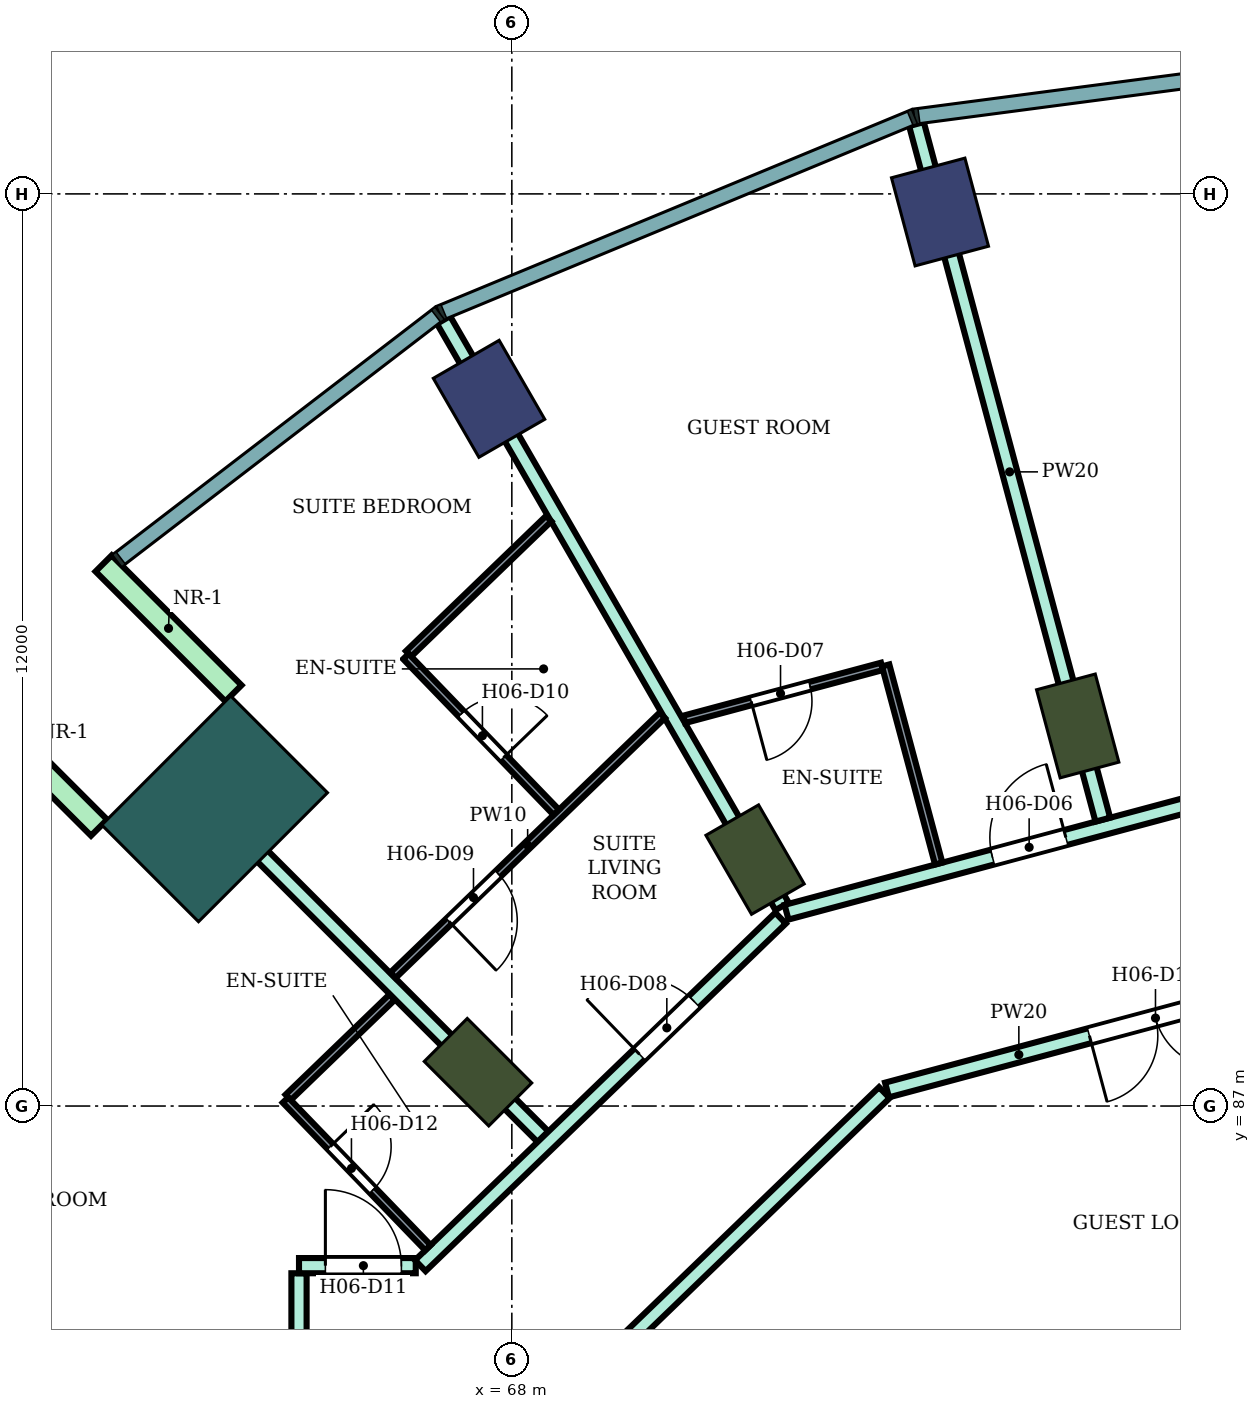
"""IFC4 building model, lengths in metres.
Left out: names, types, materials, properties, quantities, classifications, styles, units other than length and angle.
Written with IfcOpenShell. Run it as: python <this file> out.ifc"""

import sys

from ifc_helpers import new_model, si_unit, direction, frame, frame_2d, origin, origin_2d, place, context, subcontext, project, spatial, rectangle, extrude, element, fill, save


model = new_model("IFC4")
c1 = context("Model", 3, precision=1e-05, world=origin(), true_north=direction((0.0, 1.0)))
c2 = subcontext(c1, "Body", "Model", "MODEL_VIEW")
j1 = project(units=[si_unit("LENGTHUNIT", "METRE"), si_unit("PLANEANGLEUNIT", "RADIAN")], contexts=[c1])
p1 = place(None, origin())
s1 = spatial("IfcSite", under=j1, at=p1, CompositionType="ELEMENT")
p2 = place(p1, origin())
s2 = spatial("IfcBuilding", under=s1, at=p2, CompositionType="ELEMENT")
p3 = place(p2, frame((0.0, 0.0, 97.6)))
s3 = spatial("IfcBuildingStorey", under=s2, at=p3, CompositionType="ELEMENT", Elevation=97.6)
for number, where, z_axis, x_axis in (
    (1, (73.633, 98.762, 0.0), (0.0, 0.0, 1.0), (-0.259, 0.966, 0.0)),
    (2, (67.7, 96.304, 0.0), (0.0, 0.0, 1.0), (-0.5, 0.866, 0.0)),
):
    element("IfcColumn", number, at=place(p3, frame(where, z_axis=z_axis, x_axis=x_axis)), inside=s3, PredefinedType="COLUMN", context=c2, shape_type="SweptSolid", body=[
        extrude(rectangle(XDim=1.2, YDim=1.0, at=origin_2d()), origin(), (0.0, 0.0, 1.0), 3.8),
    ])
for number, where, z_axis, x_axis in (
    (3, (75.445, 92.0, 0.0), (0.0, 0.0, 1.0), (-0.259, 0.966, 0.0)),
    (4, (71.2, 90.242, 0.0), (0.0, 0.0, 1.0), (-0.5, 0.866, 0.0)),
    (5, (67.555, 87.445, 0.0), (0.0, 0.0, 1.0), (-0.707, 0.707, 0.0)),
):
    element("IfcColumn", number, at=place(p3, frame(where, z_axis=z_axis, x_axis=x_axis)), inside=s3, PredefinedType="COLUMN", context=c2, shape_type="SweptSolid", body=[
        extrude(rectangle(XDim=1.2, YDim=0.8, at=origin_2d()), origin(), (0.0, 0.0, 1.0), 3.8),
    ])
p4 = place(p3, frame((64.09, 90.91, 0.0), z_axis=(0.0, 0.0, 1.0), x_axis=(-0.707106781187, 0.707106781187, 0.0)))
e6 = element("IfcColumn", 6, at=p4, inside=s3, PredefinedType="COLUMN", context=c2, shape_type="SweptSolid", body=[
    extrude(rectangle(XDim=1.8, YDim=2.4, at=origin_2d()), origin(), (0.0, 0.0, 1.0), 3.8),
])
for number, where, z_axis, x_axis in (
    (7, (64.338, 92.43, 0.0), (0.0, 0.0, 1.0), (-0.707, 0.707, 0.0)),
    (8, (62.57, 90.662, 0.0), (0.0, 0.0, 1.0), (-0.707, 0.707, 0.0)),
):
    element("IfcWall", number, at=place(p3, frame(where, z_axis=z_axis, x_axis=x_axis)), inside=s3, PredefinedType="NOTDEFINED", context=c2, shape_type="SweptSolid", body=[
        extrude(rectangle(XDim=2.416, YDim=0.3, at=frame_2d((1.208, 0.0))), origin(), (0.0, 0.0, 1.0), 3.8),
    ])
p5 = place(p3, frame((63.6, 91.409, 0.0), z_axis=(0.0, 0.0, 1.0), x_axis=(0.706945318761, -0.707268206752, 0.0)))
e9 = element("IfcWall", 9, at=p5, inside=s3, PredefinedType="PARTITIONING", context=c2, shape_type="SweptSolid", body=[
    extrude(rectangle(XDim=6.805, YDim=0.2, at=frame_2d((3.402, 0.0))), origin(), (0.0, 0.0, 1.0), 3.35),
])
p6 = place(p3, frame((65.2, 83.401, 0.0), z_axis=(0.0, 0.0, 1.0), x_axis=(0.0, 1.0, 0.0)))
e10 = element("IfcWall", 10, at=p6, inside=s3, PredefinedType="PARTITIONING", context=c2, shape_type="SweptSolid", body=[
    extrude(rectangle(XDim=1.399, YDim=0.2, at=frame_2d((0.7, 0.0))), origin(), (0.0, 0.0, 1.0), 3.35),
])
p7 = place(p3, frame((65.2, 84.9, 0.0), z_axis=(0.0, 0.0, 1.0), x_axis=(1.0, 0.0, 0.0)))
e11 = element("IfcWall", 11, at=p7, inside=s3, PredefinedType="PARTITIONING", context=c2, shape_type="SweptSolid", body=[
    extrude(rectangle(XDim=1.536, YDim=0.2, at=frame_2d((0.768, 0.0))), origin(), (0.0, 0.0, 1.0), 3.35),
])
p8 = place(p7, frame((0.347, 0.0, 0.0)))
e12 = element("IfcOpeningElement", 12, at=p8, cuts=e11, PredefinedType="OPENING", context=c2, shape_type="SweptSolid", body=[
    extrude(rectangle(XDim=1.0, YDim=2.1, at=frame_2d((0.5, 1.05))), frame((0.0, 0.11, 0.0), z_axis=(0.0, -1.0, 0.0), x_axis=(1.0, 0.0, 0.0)), (0.0, 0.0, 1.0), 0.22),
])
p9 = place(p3, frame((66.796, 84.9, 0.0), z_axis=(0.0, 0.0, 1.0), x_axis=(0.719690784855, 0.694294731505, 0.0)))
e13 = element("IfcWall", 13, at=p9, inside=s3, PredefinedType="PARTITIONING", context=c2, shape_type="SweptSolid", body=[
    extrude(rectangle(XDim=6.585, YDim=0.2, at=frame_2d((3.292, 0.0))), origin(), (0.0, 0.0, 1.0), 3.35),
])
p10 = place(p9, frame((4.006, 0.0, 0.0)))
e14 = element("IfcOpeningElement", 14, at=p10, cuts=e13, PredefinedType="OPENING", context=c2, shape_type="SweptSolid", body=[
    extrude(rectangle(XDim=1.0, YDim=2.1, at=frame_2d((0.5, 1.05))), frame((0.0, 0.11, 0.0), z_axis=(0.0, -1.0, 0.0), x_axis=(1.0, 0.0, 0.0)), (0.0, 0.0, 1.0), 0.22),
])
p11 = place(p3, frame((67.102, 97.342, 0.0), z_axis=(0.0, 0.0, 1.0), x_axis=(0.499900389553, -0.866082906265, 0.0)))
e15 = element("IfcWall", 15, at=p11, inside=s3, PredefinedType="PARTITIONING", context=c2, shape_type="SweptSolid", body=[
    extrude(rectangle(XDim=8.908, YDim=0.2, at=frame_2d((4.454, 0.0))), origin(), (0.0, 0.0, 1.0), 3.35),
])
p12 = place(p3, frame((68.987, 83.4, 0.0), z_axis=(0.0, 0.0, 1.0), x_axis=(0.719586298962, 0.694403022997, 0.0)))
e16 = element("IfcWall", 16, at=p12, inside=s3, PredefinedType="PARTITIONING", context=c2, shape_type="SweptSolid", body=[
    extrude(rectangle(XDim=5.439, YDim=0.2, at=frame_2d((2.719, 0.0))), origin(), (0.0, 0.0, 1.0), 3.35),
])
p13 = place(p3, frame((71.614, 89.55, 0.0), z_axis=(0.0, 0.0, 1.0), x_axis=(0.965982378603, 0.258607896685, 0.0)))
e17 = element("IfcWall", 17, at=p13, inside=s3, PredefinedType="PARTITIONING", context=c2, shape_type="SweptSolid", body=[
    extrude(rectangle(XDim=8.632, YDim=0.2, at=frame_2d((4.316, 0.0))), origin(), (0.0, 0.0, 1.0), 3.35),
])
p14 = place(p13, frame((2.804, 0.0, 0.0)))
e18 = element("IfcOpeningElement", 18, at=p14, cuts=e17, PredefinedType="OPENING", context=c2, shape_type="SweptSolid", body=[
    extrude(rectangle(XDim=1.0, YDim=2.1, at=frame_2d((0.5, 1.05))), frame((0.0, 0.11, 0.0), z_axis=(0.0, -1.0, 0.0), x_axis=(1.0, 0.0, 0.0)), (0.0, 0.0, 1.0), 0.22),
])
p15 = place(p3, frame((72.936, 87.211, 0.0), z_axis=(0.0, 0.0, 1.0), x_axis=(0.965917703859, 0.258849356521, 0.0)))
e19 = element("IfcWall", 19, at=p15, inside=s3, PredefinedType="PARTITIONING", context=c2, shape_type="SweptSolid", body=[
    extrude(rectangle(XDim=7.182, YDim=0.2, at=frame_2d((3.591, 0.0))), origin(), (0.0, 0.0, 1.0), 3.35),
])
p16 = place(p15, frame((2.757, 0.0, 0.0)))
e20 = element("IfcOpeningElement", 20, at=p16, cuts=e19, PredefinedType="OPENING", context=c2, shape_type="SweptSolid", body=[
    extrude(rectangle(XDim=1.8, YDim=2.1, at=frame_2d((0.9, 1.05))), frame((0.0, 0.11, 0.0), z_axis=(0.0, -1.0, 0.0), x_axis=(1.0, 0.0, 0.0)), (0.0, 0.0, 1.0), 0.22),
])
p17 = place(p3, frame((73.323, 99.918, 0.0), z_axis=(0.0, 0.0, 1.0), x_axis=(0.258812513968, -0.965927576278, 0.0)))
e21 = element("IfcWall", 21, at=p17, inside=s3, PredefinedType="PARTITIONING", context=c2, shape_type="SweptSolid", body=[
    extrude(rectangle(XDim=9.474, YDim=0.2, at=frame_2d((4.737, 0.0))), origin(), (0.0, 0.0, 1.0), 3.35),
])
p18 = place(p3, frame((65.058, 87.114, 0.0), z_axis=(0.0, 0.0, 1.0), x_axis=(0.719653890619, 0.694332973232, 0.0)))
e22 = element("IfcWall", 22, at=p18, inside=s3, PredefinedType="PARTITIONING", context=c2, shape_type="SweptSolid", body=[
    extrude(rectangle(XDim=1.899, YDim=0.1, at=frame_2d((0.95, 0.0))), origin(), (0.0, 0.0, 1.0), 3.35),
])
p19 = place(p3, frame((65.022, 87.079, 0.0), z_axis=(0.0, 0.0, 1.0), x_axis=(0.694287838235, -0.719697434815, 0.0)))
e23 = element("IfcWall", 23, at=p19, inside=s3, PredefinedType="PARTITIONING", context=c2, shape_type="SweptSolid", body=[
    extrude(rectangle(XDim=2.7, YDim=0.1, at=frame_2d((1.35, 0.0))), origin(), (0.0, 0.0, 1.0), 3.35),
])
p20 = place(p19, frame((0.85, 0.0, 0.0)))
e24 = element("IfcOpeningElement", 24, at=p20, cuts=e23, PredefinedType="OPENING", context=c2, shape_type="SweptSolid", body=[
    extrude(rectangle(XDim=0.8, YDim=2.1, at=frame_2d((0.4, 1.05))), frame((0.0, 0.06, 0.0), z_axis=(0.0, -1.0, 0.0), x_axis=(1.0, 0.0, 0.0)), (0.0, 0.0, 1.0), 0.12),
])
p21 = place(p3, frame((66.436, 88.72, 0.0), z_axis=(0.0, 0.0, 1.0), x_axis=(0.719585934284, 0.694403400899, 0.0)))
e25 = element("IfcWall", 25, at=p21, inside=s3, PredefinedType="PARTITIONING", context=c2, shape_type="SweptSolid", body=[
    extrude(rectangle(XDim=4.925, YDim=0.1, at=frame_2d((2.462, 0.0))), origin(), (0.0, 0.0, 1.0), 3.35),
])
p22 = place(p21, frame((1.022, 0.0, 0.0)))
e26 = element("IfcOpeningElement", 26, at=p22, cuts=e25, PredefinedType="OPENING", context=c2, shape_type="SweptSolid", body=[
    extrude(rectangle(XDim=0.9, YDim=2.1, at=frame_2d((0.45, 1.05))), frame((0.0, 0.06, 0.0), z_axis=(0.0, -1.0, 0.0), x_axis=(1.0, 0.0, 0.0)), (0.0, 0.0, 1.0), 0.12),
])
p23 = place(p3, frame((66.642, 92.95, 0.0), z_axis=(0.0, 0.0, 1.0), x_axis=(0.719667412702, 0.694318957753, 0.0)))
e27 = element("IfcWall", 27, at=p23, inside=s3, PredefinedType="PARTITIONING", context=c2, shape_type="SweptSolid", body=[
    extrude(rectangle(XDim=2.562, YDim=0.1, at=frame_2d((1.281, 0.0))), origin(), (0.0, 0.0, 1.0), 3.35),
])
p24 = place(p3, frame((66.606, 92.915, 0.0), z_axis=(0.0, 0.0, 1.0), x_axis=(0.694403413121, -0.71958592249, 0.0)))
e28 = element("IfcWall", 28, at=p24, inside=s3, PredefinedType="PARTITIONING", context=c2, shape_type="SweptSolid", body=[
    extrude(rectangle(XDim=2.85, YDim=0.1, at=frame_2d((1.425, 0.0))), origin(), (0.0, 0.0, 1.0), 3.35),
])
p25 = place(p24, frame((1.05, 0.0, 0.0)))
e29 = element("IfcOpeningElement", 29, at=p25, cuts=e28, PredefinedType="OPENING", context=c2, shape_type="SweptSolid", body=[
    extrude(rectangle(XDim=0.8, YDim=2.1, at=frame_2d((0.4, 1.05))), frame((0.0, 0.06, 0.0), z_axis=(0.0, -1.0, 0.0), x_axis=(1.0, 0.0, 0.0)), (0.0, 0.0, 1.0), 0.12),
])
p26 = place(p3, frame((70.268, 92.087, 0.0), z_axis=(0.0, 0.0, 1.0), x_axis=(0.965937937835, 0.258773839966, 0.0)))
e30 = element("IfcWall", 30, at=p26, inside=s3, PredefinedType="PARTITIONING", context=c2, shape_type="SweptSolid", body=[
    extrude(rectangle(XDim=2.694, YDim=0.1, at=frame_2d((1.347, 0.0))), origin(), (0.0, 0.0, 1.0), 3.35),
])
p27 = place(p26, frame((0.912, 0.0, 0.0)))
e31 = element("IfcOpeningElement", 31, at=p27, cuts=e30, PredefinedType="OPENING", context=c2, shape_type="SweptSolid", body=[
    extrude(rectangle(XDim=0.8, YDim=2.1, at=frame_2d((0.4, 1.05))), frame((0.0, 0.06, 0.0), z_axis=(0.0, -1.0, 0.0), x_axis=(1.0, 0.0, 0.0)), (0.0, 0.0, 1.0), 0.12),
])
p28 = place(p3, frame((72.918, 92.797, 0.0), z_axis=(0.0, 0.0, 1.0), x_axis=(0.25867580527, -0.965964195904, 0.0)))
e32 = element("IfcWall", 32, at=p28, inside=s3, PredefinedType="PARTITIONING", context=c2, shape_type="SweptSolid", body=[
    extrude(rectangle(XDim=2.699, YDim=0.1, at=frame_2d((1.35, 0.0))), origin(), (0.0, 0.0, 1.0), 3.35),
])
p29 = place(p14, origin())
e33 = element("IfcDoor", 33, at=p29, inside=s3, OperationType="SINGLE_SWING_RIGHT", PredefinedType="DOOR", context=c2, shape_type="SweptSolid", body=[
    extrude(rectangle(XDim=1.0, YDim=2.1, at=frame_2d((0.5, 1.05))), frame((0.0, 0.025, 0.0), z_axis=(0.0, -1.0, 0.0), x_axis=(1.0, 0.0, 0.0)), (0.0, 0.0, 1.0), 0.05),
])
fill(e18, e33)
p30 = place(p27, frame((0.8, 0.0, 0.0), z_axis=(0.0, 0.0, 1.0), x_axis=(-1.0, 0.0, 0.0)))
e34 = element("IfcDoor", 34, at=p30, inside=s3, OperationType="SINGLE_SWING_RIGHT", PredefinedType="DOOR", context=c2, shape_type="SweptSolid", body=[
    extrude(rectangle(XDim=0.8, YDim=2.1, at=frame_2d((0.4, 1.05))), frame((0.0, 0.025, 0.0), z_axis=(0.0, -1.0, 0.0), x_axis=(1.0, 0.0, 0.0)), (0.0, 0.0, 1.0), 0.05),
])
fill(e31, e34)
p31 = place(p10, origin())
e35 = element("IfcDoor", 35, at=p31, inside=s3, OperationType="SINGLE_SWING_LEFT", PredefinedType="DOOR", context=c2, shape_type="SweptSolid", body=[
    extrude(rectangle(XDim=1.0, YDim=2.1, at=frame_2d((0.5, 1.05))), frame((0.0, 0.025, 0.0), z_axis=(0.0, -1.0, 0.0), x_axis=(1.0, 0.0, 0.0)), (0.0, 0.0, 1.0), 0.05),
])
fill(e14, e35)
p32 = place(p22, frame((0.9, 0.0, 0.0), z_axis=(0.0, 0.0, 1.0), x_axis=(-1.0, 0.0, 0.0)))
e36 = element("IfcDoor", 36, at=p32, inside=s3, OperationType="SINGLE_SWING_RIGHT", PredefinedType="DOOR", context=c2, shape_type="SweptSolid", body=[
    extrude(rectangle(XDim=0.9, YDim=2.1, at=frame_2d((0.45, 1.05))), frame((0.0, 0.025, 0.0), z_axis=(0.0, -1.0, 0.0), x_axis=(1.0, 0.0, 0.0)), (0.0, 0.0, 1.0), 0.05),
])
fill(e26, e36)
p33 = place(p25, origin())
e37 = element("IfcDoor", 37, at=p33, inside=s3, OperationType="SINGLE_SWING_RIGHT", PredefinedType="DOOR", context=c2, shape_type="SweptSolid", body=[
    extrude(rectangle(XDim=0.8, YDim=2.1, at=frame_2d((0.4, 1.05))), frame((0.0, 0.025, 0.0), z_axis=(0.0, -1.0, 0.0), x_axis=(1.0, 0.0, 0.0)), (0.0, 0.0, 1.0), 0.05),
])
fill(e29, e37)
p34 = place(p8, origin())
e38 = element("IfcDoor", 38, at=p34, inside=s3, OperationType="SINGLE_SWING_LEFT", PredefinedType="DOOR", context=c2, shape_type="SweptSolid", body=[
    extrude(rectangle(XDim=1.0, YDim=2.1, at=frame_2d((0.5, 1.05))), frame((0.0, 0.025, 0.0), z_axis=(0.0, -1.0, 0.0), x_axis=(1.0, 0.0, 0.0)), (0.0, 0.0, 1.0), 0.05),
])
fill(e12, e38)
p35 = place(p20, origin())
e39 = element("IfcDoor", 39, at=p35, inside=s3, OperationType="SINGLE_SWING_LEFT", PredefinedType="DOOR", context=c2, shape_type="SweptSolid", body=[
    extrude(rectangle(XDim=0.8, YDim=2.1, at=frame_2d((0.4, 1.05))), frame((0.0, 0.025, 0.0), z_axis=(0.0, -1.0, 0.0), x_axis=(1.0, 0.0, 0.0)), (0.0, 0.0, 1.0), 0.05),
])
fill(e24, e39)
p36 = place(p16, frame((1.8, 0.0, 0.0), z_axis=(0.0, 0.0, 1.0), x_axis=(-1.0, 0.0, 0.0)))
e40 = element("IfcDoor", 40, at=p36, inside=s3, OperationType="DOUBLE_DOOR_SINGLE_SWING", PredefinedType="DOOR", context=c2, shape_type="SweptSolid", body=[
    extrude(rectangle(XDim=1.8, YDim=2.1, at=frame_2d((0.9, 1.05))), frame((0.0, 0.025, 0.0), z_axis=(0.0, -1.0, 0.0), x_axis=(1.0, 0.0, 0.0)), (0.0, 0.0, 1.0), 0.05),
])
fill(e20, e40)
save(model, sys.argv[1])
